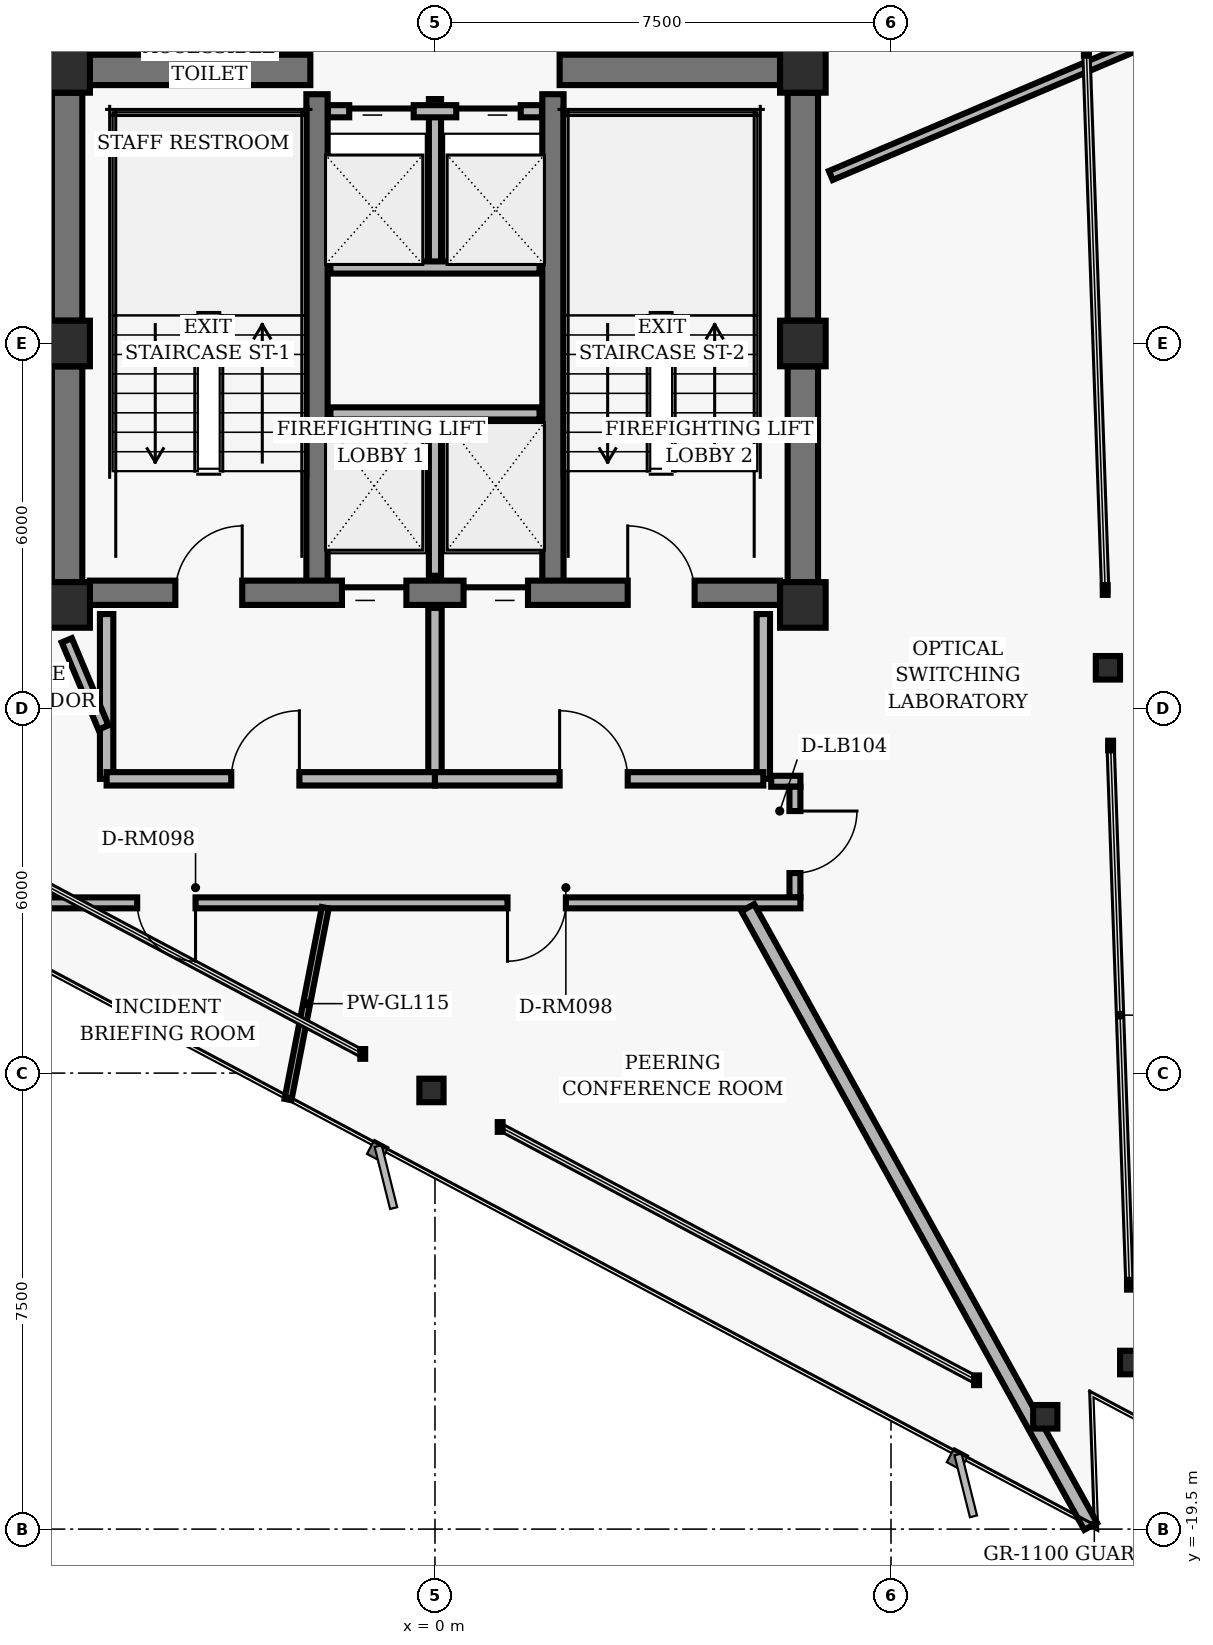
"""IFC4 building model, lengths in metres.
Left out: names, types, materials, properties, quantities, classifications, styles, units other than length and angle.
Written with IfcOpenShell. Run it as: python <this file> out.ifc"""

import sys

from ifc_helpers import new_model, si_unit, direction, frame, frame_2d, origin, origin_2d, place, context, subcontext, project, spatial, rectangle, hollow_rectangle, i_section, extrude, element, fill, save


model = new_model("IFC4")
c1 = context("Model", 3, precision=1e-05, world=origin(), true_north=direction((0.0, 1.0)))
c2 = subcontext(c1, "Body", "Model", "MODEL_VIEW")
j1 = project(units=[si_unit("LENGTHUNIT", "METRE"), si_unit("PLANEANGLEUNIT", "RADIAN")], contexts=[c1])
p1 = place(None, origin())
s1 = spatial("IfcSite", under=j1, at=p1, CompositionType="ELEMENT")
p2 = place(p1, origin())
s2 = spatial("IfcBuilding", under=s1, at=p2, CompositionType="ELEMENT")
p3 = place(p2, frame((0.0, 0.0, 199.68)))
s3 = spatial("IfcBuildingStorey", under=s2, at=p3, CompositionType="ELEMENT", Elevation=199.68)
for number, where, z_axis, x_axis in (
    (1, (-6.05, 4.5, 0.0), (0.0, 0.0, 1.0), (1.0, 0.0, 0.0)),
    (2, (6.05, 4.5, 0.0), (0.0, 0.0, 1.0), (1.0, 0.0, 0.0)),
    (3, (-6.05, 0.0, 0.0), (0.0, 0.0, 1.0), (1.0, 0.0, 0.0)),
    (4, (6.05, 0.0, 0.0), (0.0, 0.0, 1.0), (1.0, 0.0, 0.0)),
    (5, (-6.05, -4.3, 0.0), (0.0, 0.0, 1.0), (1.0, 0.0, 0.0)),
    (6, (6.05, -4.3, 0.0), (0.0, 0.0, 1.0), (1.0, 0.0, 0.0)),
):
    element("IfcColumn", number, at=place(p3, frame(where, z_axis=z_axis, x_axis=x_axis)), inside=s3, PredefinedType="COLUMN", context=c2, shape_type="SweptSolid", body=[
        extrude(hollow_rectangle(XDim=0.75, YDim=0.75, WallThickness=0.05, InnerFilletRadius=0.02, OuterFilletRadius=0.04, at=origin_2d()), origin(), (0.0, 0.0, 1.0), 3.04),
    ])
p4 = place(p3, frame((-6.05, 0.375, 0.0), z_axis=(0.0, 0.0, 1.0), x_axis=(0.0, 1.0, 0.0)))
e7 = element("IfcWall", 7, at=p4, inside=s3, PredefinedType="SHEAR", context=c2, shape_type="SweptSolid", body=[
    extrude(rectangle(XDim=3.75, YDim=0.5, at=frame_2d((1.875, 0.0))), origin(), (0.0, 0.0, 1.0), 2.798),
])
p5 = place(p3, frame((-6.05, -3.925, 0.0), z_axis=(0.0, 0.0, 1.0), x_axis=(0.0, 1.0, 0.0)))
e8 = element("IfcWall", 8, at=p5, inside=s3, PredefinedType="SHEAR", context=c2, shape_type="SweptSolid", body=[
    extrude(rectangle(XDim=3.55, YDim=0.5, at=frame_2d((1.775, 0.0))), origin(), (0.0, 0.0, 1.0), 2.798),
])
p6 = place(p3, frame((6.05, 0.375, 0.0), z_axis=(0.0, 0.0, 1.0), x_axis=(0.0, 1.0, 0.0)))
e9 = element("IfcWall", 9, at=p6, inside=s3, PredefinedType="SHEAR", context=c2, shape_type="SweptSolid", body=[
    extrude(rectangle(XDim=3.75, YDim=0.5, at=frame_2d((1.875, 0.0))), origin(), (0.0, 0.0, 1.0), 2.798),
])
p7 = place(p3, frame((6.05, -3.925, 0.0), z_axis=(0.0, 0.0, 1.0), x_axis=(0.0, 1.0, 0.0)))
e10 = element("IfcWall", 10, at=p7, inside=s3, PredefinedType="SHEAR", context=c2, shape_type="SweptSolid", body=[
    extrude(rectangle(XDim=3.55, YDim=0.5, at=frame_2d((1.775, 0.0))), origin(), (0.0, 0.0, 1.0), 2.798),
])
for number, where, z_axis, x_axis in (
    (11, (-1.94, -4.1, 0.0), (0.0, 0.0, 1.0), (0.0, 1.0, 0.0)),
    (12, (1.94, -4.1, 0.0), (0.0, 0.0, 1.0), (0.0, 1.0, 0.0)),
):
    element("IfcWall", number, at=place(p3, frame(where, z_axis=z_axis, x_axis=x_axis)), inside=s3, PredefinedType="SHEAR", context=c2, shape_type="SweptSolid", body=[
        extrude(rectangle(XDim=8.2, YDim=0.35, at=frame_2d((4.1, 0.0))), origin(), (0.0, 0.0, 1.0), 2.798),
    ])
p8 = place(p3, frame((-5.675, -4.1, 0.0), z_axis=(0.0, 0.0, 1.0), x_axis=(1.0, 0.0, 0.0)))
e13 = element("IfcWall", 13, at=p8, inside=s3, PredefinedType="SHEAR", context=c2, shape_type="SweptSolid", body=[
    extrude(rectangle(XDim=11.35, YDim=0.4, at=frame_2d((5.675, 0.0))), origin(), (0.0, 0.0, 1.0), 2.798),
])
p9 = place(p8, frame((1.405, 0.0, 0.0)))
e14 = element("IfcOpeningElement", 14, at=p9, cuts=e13, PredefinedType="OPENING", context=c2, shape_type="SweptSolid", body=[
    extrude(rectangle(XDim=1.1, YDim=2.04, at=frame_2d((0.55, 1.02))), frame((0.0, 0.21, 0.0), z_axis=(0.0, -1.0, 0.0), x_axis=(1.0, 0.0, 0.0)), (0.0, 0.0, 1.0), 0.42),
])
p10 = place(p8, frame((8.845, 0.0, 0.0)))
e15 = element("IfcOpeningElement", 15, at=p10, cuts=e13, PredefinedType="OPENING", context=c2, shape_type="SweptSolid", body=[
    extrude(rectangle(XDim=1.1, YDim=2.04, at=frame_2d((0.55, 1.02))), frame((0.0, 0.21, 0.0), z_axis=(0.0, -1.0, 0.0), x_axis=(1.0, 0.0, 0.0)), (0.0, 0.0, 1.0), 0.42),
])
p11 = place(p8, frame((4.145, 0.0, 0.0)))
e16 = element("IfcOpeningElement", 16, at=p11, cuts=e13, PredefinedType="OPENING", context=c2, shape_type="SweptSolid", body=[
    extrude(rectangle(XDim=1.06, YDim=2.04, at=frame_2d((0.53, 1.02))), frame((0.0, 0.21, 0.0), z_axis=(0.0, -1.0, 0.0), x_axis=(1.0, 0.0, 0.0)), (0.0, 0.0, 1.0), 0.42),
])
p12 = place(p8, frame((6.145, 0.0, 0.0)))
e17 = element("IfcOpeningElement", 17, at=p12, cuts=e13, PredefinedType="OPENING", context=c2, shape_type="SweptSolid", body=[
    extrude(rectangle(XDim=1.06, YDim=2.04, at=frame_2d((0.53, 1.02))), frame((0.0, 0.21, 0.0), z_axis=(0.0, -1.0, 0.0), x_axis=(1.0, 0.0, 0.0)), (0.0, 0.0, 1.0), 0.42),
])
for number, where, z_axis, x_axis in (
    (18, (-5.675, 4.5, 0.0), (0.0, 0.0, 1.0), (1.0, 0.0, 0.0)),
    (19, (2.05, 4.5, 0.0), (0.0, 0.0, 1.0), (1.0, 0.0, 0.0)),
):
    element("IfcWall", number, at=place(p3, frame(where, z_axis=z_axis, x_axis=x_axis)), inside=s3, PredefinedType="SHEAR", context=c2, shape_type="SweptSolid", body=[
        extrude(rectangle(XDim=3.625, YDim=0.5, at=frame_2d((1.812, 0.0))), origin(), (0.0, 0.0, 1.0), 2.798),
    ])
for number, where, z_axis, x_axis in (
    (20, (11.466, -16.76, 0.0), (0.0, 0.0, 1.0), (1.0, 0.0, 0.0)),
    (21, (11.067, -5.334, 0.0), (0.0, 0.0, 1.0), (1.0, 0.0, 0.0)),
    (22, (-0.058, -12.285, 0.0), (0.0, 0.0, 1.0), (1.0, 0.0, 0.0)),
    (23, (10.037, -17.653, 0.0), (0.0, 0.0, 1.0), (1.0, 0.0, 0.0)),
):
    element("IfcColumn", number, at=place(p3, frame(where, z_axis=z_axis, x_axis=x_axis)), inside=s3, PredefinedType="COLUMN", context=c2, shape_type="SweptSolid", body=[
        extrude(i_section(OverallWidth=0.398, OverallDepth=0.387, WebThickness=0.021, FlangeThickness=0.033, FilletRadius=0.018, at=origin_2d()), origin(), (0.0, 0.0, 1.0), 3.04),
    ])
p13 = place(p3, frame((0.0, -3.82, 0.0), z_axis=(0.0, 0.0, 1.0), x_axis=(0.0, 1.0, 0.0)))
e24 = element("IfcWall", 24, at=p13, inside=s3, PredefinedType="PARTITIONING", context=c2, shape_type="SweptSolid", body=[
    extrude(rectangle(XDim=2.67, YDim=0.2, at=frame_2d((1.335, 0.0))), origin(), (0.0, 0.0, 1.0), 2.773),
])
p14 = place(p3, frame((-1.72, -1.15, 0.0), z_axis=(0.0, 0.0, 1.0), x_axis=(1.0, 0.0, 0.0)))
e25 = element("IfcWall", 25, at=p14, inside=s3, PredefinedType="PARTITIONING", context=c2, shape_type="SweptSolid", body=[
    extrude(rectangle(XDim=3.44, YDim=0.2, at=frame_2d((1.72, 0.0))), origin(), (0.0, 0.0, 1.0), 2.773),
])
for number, where, z_axis, x_axis in (
    (26, (-5.4, -7.16, 0.0), (0.0, 0.0, 1.0), (0.0, 1.0, 0.0)),
    (27, (5.4, -7.16, 0.0), (0.0, 0.0, 1.0), (0.0, 1.0, 0.0)),
):
    element("IfcWall", number, at=place(p3, frame(where, z_axis=z_axis, x_axis=x_axis)), inside=s3, PredefinedType="PARTITIONING", context=c2, shape_type="SweptSolid", body=[
        extrude(rectangle(XDim=2.71, YDim=0.22, at=frame_2d((1.355, 0.0))), origin(), (0.0, 0.0, 1.0), 2.773),
    ])
p15 = place(p3, frame((0.0, -7.16, 0.0), z_axis=(0.0, 0.0, 1.0), x_axis=(0.0, 1.0, 0.0)))
e28 = element("IfcWall", 28, at=p15, inside=s3, PredefinedType="PARTITIONING", context=c2, shape_type="SweptSolid", body=[
    extrude(rectangle(XDim=2.81, YDim=0.22, at=frame_2d((1.405, 0.0))), origin(), (0.0, 0.0, 1.0), 2.773),
])
p16 = place(p3, frame((-5.4, -7.16, 0.0), z_axis=(0.0, 0.0, 1.0), x_axis=(1.0, 0.0, 0.0)))
e29 = element("IfcWall", 29, at=p16, inside=s3, PredefinedType="PARTITIONING", context=c2, shape_type="SweptSolid", body=[
    extrude(rectangle(XDim=5.4, YDim=0.22, at=frame_2d((2.7, 0.0))), origin(), (0.0, 0.0, 1.0), 2.395),
])
p17 = place(p16, frame((2.05, 0.0, 0.0)))
e30 = element("IfcOpeningElement", 30, at=p17, cuts=e29, PredefinedType="OPENING", context=c2, shape_type="SweptSolid", body=[
    extrude(rectangle(XDim=1.12, YDim=2.02, at=frame_2d((0.56, 1.01))), frame((0.0, 0.12, 0.0), z_axis=(0.0, -1.0, 0.0), x_axis=(1.0, 0.0, 0.0)), (0.0, 0.0, 1.0), 0.24),
])
p18 = place(p3, frame((0.0, -7.16, 0.0), z_axis=(0.0, 0.0, 1.0), x_axis=(1.0, 0.0, 0.0)))
e31 = element("IfcWall", 31, at=p18, inside=s3, PredefinedType="PARTITIONING", context=c2, shape_type="SweptSolid", body=[
    extrude(rectangle(XDim=5.4, YDim=0.22, at=frame_2d((2.7, 0.0))), origin(), (0.0, 0.0, 1.0), 2.773),
])
p19 = place(p18, frame((2.05, 0.0, 0.0)))
e32 = element("IfcOpeningElement", 32, at=p19, cuts=e31, PredefinedType="OPENING", context=c2, shape_type="SweptSolid", body=[
    extrude(rectangle(XDim=1.12, YDim=2.02, at=frame_2d((0.56, 1.01))), frame((0.0, 0.12, 0.0), z_axis=(0.0, -1.0, 0.0), x_axis=(1.0, 0.0, 0.0)), (0.0, 0.0, 1.0), 0.24),
])
p20 = place(p3, frame((0.0, 1.25, 0.0), z_axis=(0.0, 0.0, 1.0), x_axis=(0.0, 1.0, 0.0)))
e33 = element("IfcWall", 33, at=p20, inside=s3, PredefinedType="PARTITIONING", context=c2, shape_type="SweptSolid", body=[
    extrude(rectangle(XDim=2.77, YDim=0.2, at=frame_2d((1.385, 0.0))), origin(), (0.0, 0.0, 1.0), 2.773),
])
p21 = place(p3, frame((-1.72, 1.25, 0.0), z_axis=(0.0, 0.0, 1.0), x_axis=(1.0, 0.0, 0.0)))
e34 = element("IfcWall", 34, at=p21, inside=s3, PredefinedType="PARTITIONING", context=c2, shape_type="SweptSolid", body=[
    extrude(rectangle(XDim=3.44, YDim=0.2, at=frame_2d((1.72, 0.0))), origin(), (0.0, 0.0, 1.0), 2.773),
])
p22 = place(p3, frame((-1.76, 3.82, 0.0), z_axis=(0.0, 0.0, 1.0), x_axis=(1.0, 0.0, 0.0)))
e35 = element("IfcWall", 35, at=p22, inside=s3, PredefinedType="PARTITIONING", context=c2, shape_type="SweptSolid", body=[
    extrude(rectangle(XDim=3.52, YDim=0.2, at=frame_2d((1.76, 0.0))), origin(), (0.0, 0.0, 1.0), 2.773),
])
p23 = place(p22, frame((0.35, 0.0, 0.0)))
e36 = element("IfcOpeningElement", 36, at=p23, cuts=e35, PredefinedType="OPENING", context=c2, shape_type="SweptSolid", body=[
    extrude(rectangle(XDim=1.06, YDim=2.04, at=frame_2d((0.53, 1.02))), frame((0.0, 0.11, 0.0), z_axis=(0.0, -1.0, 0.0), x_axis=(1.0, 0.0, 0.0)), (0.0, 0.0, 1.0), 0.22),
])
p24 = place(p22, frame((2.11, 0.0, 0.0)))
e37 = element("IfcOpeningElement", 37, at=p24, cuts=e35, PredefinedType="OPENING", context=c2, shape_type="SweptSolid", body=[
    extrude(rectangle(XDim=1.06, YDim=2.04, at=frame_2d((0.53, 1.02))), frame((0.0, 0.11, 0.0), z_axis=(0.0, -1.0, 0.0), x_axis=(1.0, 0.0, 0.0)), (0.0, 0.0, 1.0), 0.22),
])
p25 = place(p3, frame((-6.055, -4.882, 0.0), z_axis=(0.0, 0.0, 1.0), x_axis=(0.387579540458, -0.921836265189, 0.0)))
e38 = element("IfcWall", 38, at=p25, inside=s3, PredefinedType="PARTITIONING", context=c2, shape_type="SweptSolid", body=[
    extrude(rectangle(XDim=1.555, YDim=0.18, at=frame_2d((0.777, 0.0))), origin(), (0.0, 0.0, 1.0), 2.253),
])
p26 = place(p3, frame((5.53, -7.2, 0.0), z_axis=(0.0, 0.0, 1.0), x_axis=(1.0, 0.0, 0.0)))
e39 = element("IfcWall", 39, at=p26, inside=s3, PredefinedType="PARTITIONING", context=c2, shape_type="SweptSolid", body=[
    extrude(rectangle(XDim=0.48, YDim=0.18, at=frame_2d((0.24, 0.0))), origin(), (0.0, 0.0, 1.0), 2.773),
])
p27 = place(p3, frame((5.92, -7.29, 0.0), z_axis=(0.0, 0.0, 1.0), x_axis=(0.0, -1.0, 0.0)))
e40 = element("IfcWall", 40, at=p27, inside=s3, PredefinedType="PARTITIONING", context=c2, shape_type="SweptSolid", body=[
    extrude(rectangle(XDim=1.82, YDim=0.18, at=frame_2d((0.91, 0.0))), origin(), (0.0, 0.0, 1.0), 2.773),
])
p28 = place(p27, frame((0.4, 0.0, 0.0)))
e41 = element("IfcOpeningElement", 41, at=p28, cuts=e40, PredefinedType="OPENING", context=c2, shape_type="SweptSolid", body=[
    extrude(rectangle(XDim=1.02, YDim=2.02, at=frame_2d((0.51, 1.01))), frame((0.0, 0.1, 0.0), z_axis=(0.0, -1.0, 0.0), x_axis=(1.0, 0.0, 0.0)), (0.0, 0.0, 1.0), 0.2),
])
p29 = place(p3, frame((6.01, -9.2, 0.0), z_axis=(0.0, 0.0, 1.0), x_axis=(-1.0, 0.0, 0.0)))
e42 = element("IfcWall", 42, at=p29, inside=s3, PredefinedType="PARTITIONING", context=c2, shape_type="SweptSolid", body=[
    extrude(rectangle(XDim=13.3, YDim=0.18, at=frame_2d((6.65, 0.0))), origin(), (0.0, 0.0, 1.0), 2.395),
])
p30 = place(p29, frame((9.948, 0.0, 0.0)))
e43 = element("IfcOpeningElement", 43, at=p30, cuts=e42, PredefinedType="OPENING", context=c2, shape_type="SweptSolid", body=[
    extrude(rectangle(XDim=0.96, YDim=2.02, at=frame_2d((0.48, 1.01))), frame((0.0, 0.1, 0.0), z_axis=(0.0, -1.0, 0.0), x_axis=(1.0, 0.0, 0.0)), (0.0, 0.0, 1.0), 0.2),
])
p31 = place(p29, frame((3.857, 0.0, 0.0)))
e44 = element("IfcOpeningElement", 44, at=p31, cuts=e42, PredefinedType="OPENING", context=c2, shape_type="SweptSolid", body=[
    extrude(rectangle(XDim=0.96, YDim=2.02, at=frame_2d((0.48, 1.01))), frame((0.0, 0.1, 0.0), z_axis=(0.0, -1.0, 0.0), x_axis=(1.0, 0.0, 0.0)), (0.0, 0.0, 1.0), 0.2),
])
p32 = place(p3, frame((-1.804, -9.28, 0.0), z_axis=(0.0, 0.0, 1.0), x_axis=(-0.190810698239, -0.981626852443, 0.0)))
e45 = element("IfcWall", 45, at=p32, inside=s3, PredefinedType="MOVABLE", context=c2, shape_type="SweptSolid", body=[
    extrude(rectangle(XDim=3.214, YDim=0.115, at=frame_2d((1.607, 0.0))), origin(), (0.0, 0.0, 1.0), 2.773),
])
p33 = place(p3, frame((5.144, -9.28, 0.0), z_axis=(0.0, 0.0, 1.0), x_axis=(0.484798043034, -0.874626124393, 0.0)))
e46 = element("IfcWall", 46, at=p33, inside=s3, PredefinedType="PARTITIONING", context=c2, shape_type="SweptSolid", body=[
    extrude(rectangle(XDim=11.633, YDim=0.24, at=frame_2d((5.816, 0.0))), origin(), (0.0, 0.0, 1.0), 2.253),
])
p34 = place(p3, frame((6.51, 2.763, 0.0), z_axis=(0.0, 0.0, 1.0), x_axis=(0.920487144923, 0.390772844543, 0.0)))
e47 = element("IfcWall", 47, at=p34, inside=s3, PredefinedType="PARTITIONING", context=c2, shape_type="SweptSolid", body=[
    extrude(rectangle(XDim=5.904, YDim=0.16, at=frame_2d((2.952, 0.0))), origin(), (0.0, 0.0, 1.0), 2.773),
])
p35 = place(p9, origin())
e48 = element("IfcDoor", 48, at=p35, inside=s3, OperationType="SINGLE_SWING_RIGHT", PredefinedType="DOOR", context=c2, shape_type="SweptSolid", body=[
    extrude(rectangle(XDim=1.1, YDim=2.04, at=frame_2d((0.55, 1.02))), frame((0.0, 0.025, 0.0), z_axis=(0.0, -1.0, 0.0), x_axis=(1.0, 0.0, 0.0)), (0.0, 0.0, 1.0), 0.05),
])
fill(e14, e48)
p36 = place(p10, origin())
e49 = element("IfcDoor", 49, at=p36, inside=s3, OperationType="SINGLE_SWING_LEFT", PredefinedType="DOOR", context=c2, shape_type="SweptSolid", body=[
    extrude(rectangle(XDim=1.1, YDim=2.04, at=frame_2d((0.55, 1.02))), frame((0.0, 0.025, 0.0), z_axis=(0.0, -1.0, 0.0), x_axis=(1.0, 0.0, 0.0)), (0.0, 0.0, 1.0), 0.05),
])
fill(e15, e49)
p37 = place(p11, origin())
e50 = element("IfcDoor", 50, at=p37, inside=s3, OperationType="SLIDING_TO_LEFT", PredefinedType="DOOR", context=c2, shape_type="SweptSolid", body=[
    extrude(rectangle(XDim=1.06, YDim=2.04, at=frame_2d((0.53, 1.02))), frame((0.0, 0.025, 0.0), z_axis=(0.0, -1.0, 0.0), x_axis=(1.0, 0.0, 0.0)), (0.0, 0.0, 1.0), 0.05),
])
fill(e16, e50)
p38 = place(p12, origin())
e51 = element("IfcDoor", 51, at=p38, inside=s3, OperationType="SLIDING_TO_RIGHT", PredefinedType="DOOR", context=c2, shape_type="SweptSolid", body=[
    extrude(rectangle(XDim=1.06, YDim=2.04, at=frame_2d((0.53, 1.02))), frame((0.0, 0.025, 0.0), z_axis=(0.0, -1.0, 0.0), x_axis=(1.0, 0.0, 0.0)), (0.0, 0.0, 1.0), 0.05),
])
fill(e17, e51)
p39 = place(p17, origin())
e52 = element("IfcDoor", 52, at=p39, inside=s3, OperationType="SINGLE_SWING_RIGHT", PredefinedType="DOOR", context=c2, shape_type="SweptSolid", body=[
    extrude(rectangle(XDim=1.12, YDim=2.02, at=frame_2d((0.56, 1.01))), frame((0.0, 0.025, 0.0), z_axis=(0.0, -1.0, 0.0), x_axis=(1.0, 0.0, 0.0)), (0.0, 0.0, 1.0), 0.05),
])
fill(e30, e52)
p40 = place(p19, origin())
e53 = element("IfcDoor", 53, at=p40, inside=s3, OperationType="SINGLE_SWING_LEFT", PredefinedType="DOOR", context=c2, shape_type="SweptSolid", body=[
    extrude(rectangle(XDim=1.12, YDim=2.02, at=frame_2d((0.56, 1.01))), frame((0.0, 0.025, 0.0), z_axis=(0.0, -1.0, 0.0), x_axis=(1.0, 0.0, 0.0)), (0.0, 0.0, 1.0), 0.05),
])
fill(e32, e53)
p41 = place(p23, origin())
e54 = element("IfcDoor", 54, at=p41, inside=s3, OperationType="SLIDING_TO_LEFT", PredefinedType="DOOR", context=c2, shape_type="SweptSolid", body=[
    extrude(rectangle(XDim=1.06, YDim=2.04, at=frame_2d((0.53, 1.02))), frame((0.0, 0.025, 0.0), z_axis=(0.0, -1.0, 0.0), x_axis=(1.0, 0.0, 0.0)), (0.0, 0.0, 1.0), 0.05),
])
fill(e36, e54)
p42 = place(p24, origin())
e55 = element("IfcDoor", 55, at=p42, inside=s3, OperationType="SLIDING_TO_RIGHT", PredefinedType="DOOR", context=c2, shape_type="SweptSolid", body=[
    extrude(rectangle(XDim=1.06, YDim=2.04, at=frame_2d((0.53, 1.02))), frame((0.0, 0.025, 0.0), z_axis=(0.0, -1.0, 0.0), x_axis=(1.0, 0.0, 0.0)), (0.0, 0.0, 1.0), 0.05),
])
fill(e37, e55)
p43 = place(p30, origin())
e56 = element("IfcDoor", 56, at=p43, inside=s3, OperationType="SINGLE_SWING_LEFT", PredefinedType="DOOR", context=c2, shape_type="SweptSolid", body=[
    extrude(rectangle(XDim=0.96, YDim=2.02, at=frame_2d((0.48, 1.01))), frame((0.0, 0.025, 0.0), z_axis=(0.0, -1.0, 0.0), x_axis=(1.0, 0.0, 0.0)), (0.0, 0.0, 1.0), 0.05),
])
fill(e43, e56)
p44 = place(p31, origin())
e57 = element("IfcDoor", 57, at=p44, inside=s3, OperationType="SINGLE_SWING_RIGHT", PredefinedType="DOOR", context=c2, shape_type="SweptSolid", body=[
    extrude(rectangle(XDim=0.96, YDim=2.02, at=frame_2d((0.48, 1.01))), frame((0.0, 0.025, 0.0), z_axis=(0.0, -1.0, 0.0), x_axis=(1.0, 0.0, 0.0)), (0.0, 0.0, 1.0), 0.05),
])
fill(e44, e57)
p45 = place(p28, origin())
e58 = element("IfcDoor", 58, at=p45, inside=s3, OperationType="SINGLE_SWING_LEFT", PredefinedType="DOOR", context=c2, shape_type="SweptSolid", body=[
    extrude(rectangle(XDim=1.02, YDim=2.02, at=frame_2d((0.51, 1.01))), frame((0.0, 0.025, 0.0), z_axis=(0.0, -1.0, 0.0), x_axis=(1.0, 0.0, 0.0)), (0.0, 0.0, 1.0), 0.05),
])
fill(e41, e58)
save(model, sys.argv[1])
